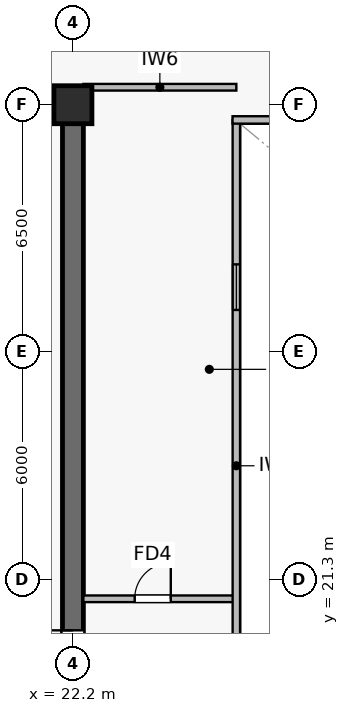
"""IFC4 building model, lengths in metres.
Left out: names, types, materials, properties, quantities, classifications, styles, units other than length and angle.
Written with IfcOpenShell. Run it as: python <this file> out.ifc"""

import sys

from ifc_helpers import new_model, si_unit, direction, frame, frame_2d, origin, origin_2d, place, context, subcontext, project, spatial, rectangle, extrude, source, transform, mapped, element, fill, save


model = new_model("IFC4")
c1 = context("Model", 3, precision=1e-05, world=origin(), true_north=direction((0.0, 1.0)))
c2 = subcontext(c1, "Body", "Model", "MODEL_VIEW")
j1 = project(units=[si_unit("LENGTHUNIT", "METRE"), si_unit("PLANEANGLEUNIT", "RADIAN")], contexts=[c1])
p1 = place(None, origin())
s1 = spatial("IfcSite", under=j1, at=p1, CompositionType="ELEMENT")
p2 = place(p1, origin())
s2 = spatial("IfcBuilding", under=s1, at=p2, CompositionType="ELEMENT")
p3 = place(p2, frame((0.0, 0.0, 230.1)))
s3 = spatial("IfcBuildingStorey", under=s2, at=p3, CompositionType="ELEMENT", Elevation=230.1)
p4 = place(p3, frame((7.125, 33.8, 0.0), z_axis=(0.0, 0.0, 1.0), x_axis=(1.0, 0.0, 0.0)))
e1 = element("IfcWall", 1, at=p4, inside=s3, PredefinedType="SHEAR", context=c2, shape_type="SweptSolid", body=[
    extrude(rectangle(XDim=15.35, YDim=0.55, at=frame_2d((7.675, 0.0))), origin(), (0.0, 0.0, 1.0), 3.8),
])
p5 = place(p4, frame((8.325, 0.0, 0.0)))
e2 = element("IfcOpeningElement", 2, at=p5, cuts=e1, PredefinedType="OPENING", context=c2, shape_type="SweptSolid", body=[
    extrude(rectangle(XDim=0.95, YDim=2.15, at=frame_2d((0.475, 1.075))), frame((0.0, 0.285, 0.0), z_axis=(0.0, -1.0, 0.0), x_axis=(1.0, 0.0, 0.0)), (0.0, 0.0, 1.0), 0.57),
])
p6 = place(p4, frame((11.865, 0.0, 0.0)))
e3 = element("IfcOpeningElement", 3, at=p6, cuts=e1, PredefinedType="OPENING", context=c2, shape_type="SweptSolid", body=[
    extrude(rectangle(XDim=0.95, YDim=2.15, at=frame_2d((0.475, 1.075))), frame((0.0, 0.285, 0.0), z_axis=(0.0, -1.0, 0.0), x_axis=(1.0, 0.0, 0.0)), (0.0, 0.0, 1.0), 0.57),
])
p7 = place(p3, frame((22.2, 15.075, 0.0), z_axis=(0.0, 0.0, 1.0), x_axis=(0.0, 1.0, 0.0)))
e4 = element("IfcWall", 4, at=p7, inside=s3, PredefinedType="SHEAR", context=c2, shape_type="SweptSolid", body=[
    extrude(rectangle(XDim=18.45, YDim=0.55, at=frame_2d((9.225, 0.0))), origin(), (0.0, 0.0, 1.0), 3.8),
])
p8 = place(p7, frame((3.475, 0.0, 0.0)))
e5 = element("IfcOpeningElement", 5, at=p8, cuts=e4, PredefinedType="OPENING", context=c2, shape_type="SweptSolid", body=[
    extrude(rectangle(XDim=1.42, YDim=2.2, at=frame_2d((0.71, 1.1))), frame((0.0, 0.285, 0.0), z_axis=(0.0, -1.0, 0.0), x_axis=(1.0, 0.0, 0.0)), (0.0, 0.0, 1.0), 0.57),
])
m1 = source(origin(), c2, "Body", "SweptSolid", [
    extrude(rectangle(XDim=1.0, YDim=1.0, at=origin_2d()), origin(), (0.0, 0.0, 1.0), 4.1),
])
p9 = place(p3, frame((22.2, 33.8, 0.0), z_axis=(0.0, 0.0, 1.0), x_axis=(1.0, 0.0, 0.0)))
e6 = element("IfcColumn", 6, at=p9, inside=s3, PredefinedType="COLUMN", context=c2, shape_type="MappedRepresentation", body=[
    mapped(m1, transform((0.0, 0.0, 0.0), scale=1.0)),
])
p10 = place(p3, frame((22.475, 34.26, 0.0), z_axis=(0.0, 0.0, 1.0), x_axis=(1.0, 0.0, 0.0)))
e7 = element("IfcWall", 7, at=p10, inside=s3, PredefinedType="PARTITIONING", context=c2, shape_type="SweptSolid", body=[
    extrude(rectangle(XDim=4.025, YDim=0.175, at=frame_2d((2.012, 0.0))), origin(), (0.0, 0.0, 1.0), 3.485),
])
p11 = place(p3, frame((22.475, 20.8, 0.0), z_axis=(0.0, 0.0, 1.0), x_axis=(1.0, 0.0, 0.0)))
e8 = element("IfcWall", 8, at=p11, inside=s3, PredefinedType="PARTITIONING", context=c2, shape_type="SweptSolid", body=[
    extrude(rectangle(XDim=4.025, YDim=0.175, at=frame_2d((2.012, 0.0))), origin(), (0.0, 0.0, 1.0), 3.8),
])
p12 = place(p11, frame((1.35, 0.0, 0.0)))
e9 = element("IfcOpeningElement", 9, at=p12, cuts=e8, PredefinedType="OPENING", context=c2, shape_type="SweptSolid", body=[
    extrude(rectangle(XDim=0.95, YDim=2.15, at=frame_2d((0.475, 1.075))), frame((0.0, 0.098, 0.0), z_axis=(0.0, -1.0, 0.0), x_axis=(1.0, 0.0, 0.0)), (0.0, 0.0, 1.0), 0.195),
])
p13 = place(p3, frame((26.5, 15.2, 0.0), z_axis=(0.0, 0.0, 1.0), x_axis=(0.0, 1.0, 0.0)))
e10 = element("IfcWall", 10, at=p13, inside=s3, PredefinedType="SOLIDWALL", context=c2, shape_type="SweptSolid", body=[
    extrude(rectangle(XDim=18.2, YDim=0.195, at=frame_2d((9.1, 0.0))), origin(), (0.0, 0.0, 1.0), 3.8),
])
p14 = place(p13, frame((1.8, 0.0, 0.9)))
e11 = element("IfcOpeningElement", 11, at=p14, cuts=e10, PredefinedType="OPENING", context=c2, shape_type="SweptSolid", body=[
    extrude(rectangle(XDim=1.2, YDim=1.35, at=frame_2d((0.6, 0.675))), frame((0.0, 0.107, 0.0), z_axis=(0.0, -1.0, 0.0), x_axis=(1.0, 0.0, 0.0)), (0.0, 0.0, 1.0), 0.215),
])
p15 = place(p13, frame((13.2, 0.0, 0.9)))
e12 = element("IfcOpeningElement", 12, at=p15, cuts=e10, PredefinedType="OPENING", context=c2, shape_type="SweptSolid", body=[
    extrude(rectangle(XDim=1.2, YDim=1.35, at=frame_2d((0.6, 0.675))), frame((0.0, 0.107, 0.0), z_axis=(0.0, -1.0, 0.0), x_axis=(1.0, 0.0, 0.0)), (0.0, 0.0, 1.0), 0.215),
])
p16 = place(p3, frame((26.4, 33.4, 0.0), z_axis=(0.0, 0.0, 1.0), x_axis=(1.0, 0.0, 0.0)))
e13 = element("IfcWall", 13, at=p16, inside=s3, PredefinedType="SOLIDWALL", context=c2, shape_type="SweptSolid", body=[
    extrude(rectangle(XDim=22.0, YDim=0.195, at=frame_2d((11.0, 0.0))), origin(), (0.0, 0.0, 1.0), 3.8),
])
m2 = source(origin(), c2, "Body", "SweptSolid", [
    extrude(rectangle(XDim=1.2, YDim=1.35, at=frame_2d((0.6, 0.675))), frame((0.0, 0.03, 0.0), z_axis=(0.0, -1.0, 0.0), x_axis=(1.0, 0.0, 0.0)), (0.0, 0.0, 1.0), 0.06),
])
p17 = place(p15, origin())
e14 = element("IfcWindow", 14, at=p17, inside=s3, PartitioningType="SINGLE_PANEL", PredefinedType="WINDOW", context=c2, shape_type="MappedRepresentation", body=[
    mapped(m2, transform((0.0, 0.0, 0.0), scale=1.0)),
])
fill(e12, e14)
m3 = source(origin(), c2, "Body", "SweptSolid", [
    extrude(rectangle(XDim=1.42, YDim=2.2, at=frame_2d((0.71, 1.1))), frame((0.0, 0.025, 0.0), z_axis=(0.0, -1.0, 0.0), x_axis=(1.0, 0.0, 0.0)), (0.0, 0.0, 1.0), 0.05),
])
p18 = place(p8, origin())
e15 = element("IfcDoor", 15, at=p18, inside=s3, OperationType="DOUBLE_DOOR_SINGLE_SWING", PredefinedType="DOOR", context=c2, shape_type="MappedRepresentation", body=[
    mapped(m3, transform((0.0, 0.0, 0.0), scale=1.0)),
])
fill(e5, e15)
m4 = source(origin(), c2, "Body", "SweptSolid", [
    extrude(rectangle(XDim=0.95, YDim=2.15, at=frame_2d((0.475, 1.075))), frame((0.0, 0.025, 0.0), z_axis=(0.0, -1.0, 0.0), x_axis=(1.0, 0.0, 0.0)), (0.0, 0.0, 1.0), 0.05),
])
p19 = place(p12, origin())
e16 = element("IfcDoor", 16, at=p19, inside=s3, OperationType="SINGLE_SWING_RIGHT", PredefinedType="DOOR", context=c2, shape_type="MappedRepresentation", body=[
    mapped(m4, transform((0.0, 0.0, 0.0), scale=1.0)),
])
fill(e9, e16)
save(model, sys.argv[1])
